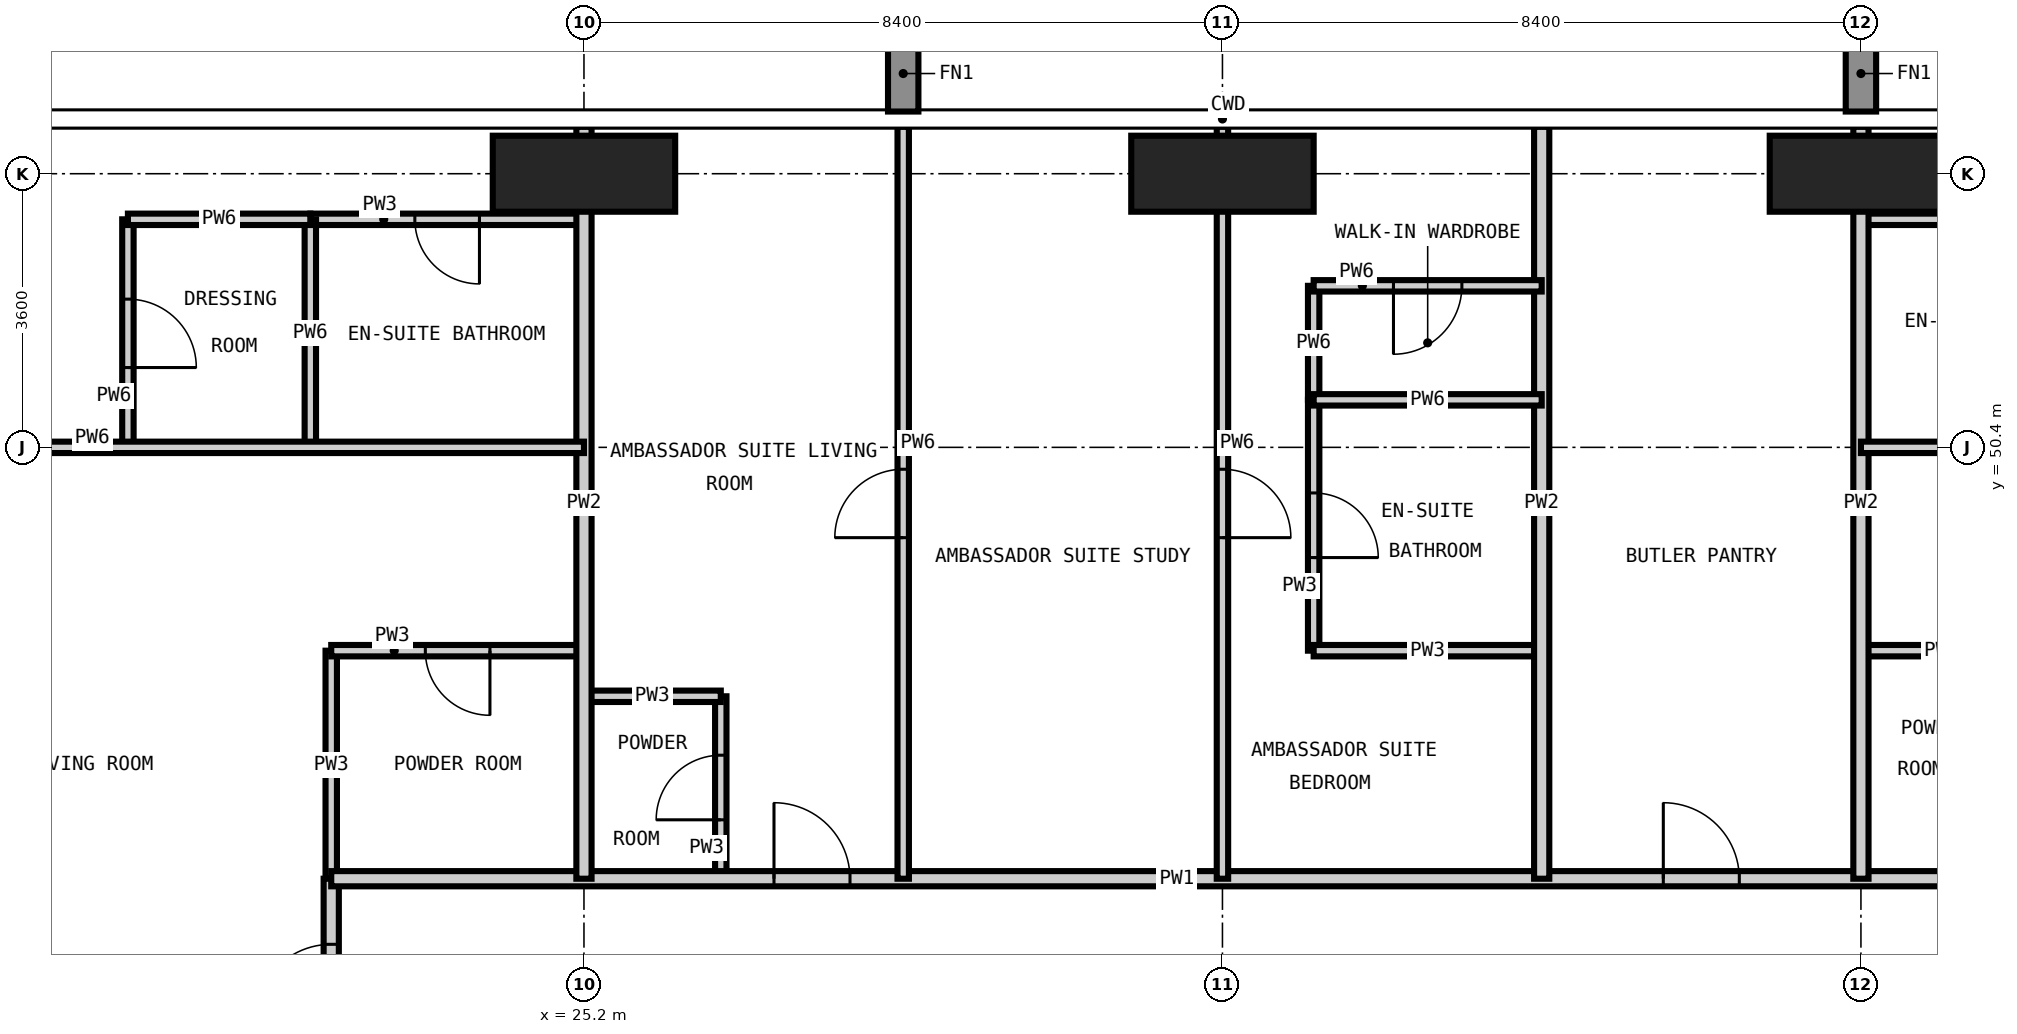
"""IFC4 building model, lengths in metres.
Left out: names, types, materials, properties, quantities, classifications, styles, units other than length and angle.
Written with IfcOpenShell. Run it as: python <this file> out.ifc"""

import sys

from ifc_helpers import new_model, si_unit, direction, frame, frame_2d, origin, origin_2d, place, context, subcontext, project, spatial, rectangle, extrude, element, fill, save


model = new_model("IFC4")
c1 = context("Model", 3, precision=1e-05, world=origin(), true_north=direction((0.0, 1.0)))
c2 = subcontext(c1, "Body", "Model", "MODEL_VIEW")
j1 = project(units=[si_unit("LENGTHUNIT", "METRE"), si_unit("PLANEANGLEUNIT", "RADIAN")], contexts=[c1])
p1 = place(None, origin())
s1 = spatial("IfcSite", under=j1, at=p1, CompositionType="ELEMENT")
p2 = place(p1, origin())
s2 = spatial("IfcBuilding", under=s1, at=p2, CompositionType="ELEMENT")
p3 = place(p2, frame((0.0, 0.0, 241.2)))
s3 = spatial("IfcBuildingStorey", under=s2, at=p3, CompositionType="ELEMENT", Elevation=241.2)
for number, where, z_axis, x_axis in (
    (1, (25.2, 54.0, -0.35), (0.0, 0.0, 1.0), (1.0, 0.0, 0.0)),
    (2, (33.6, 54.0, -0.35), (0.0, 0.0, 1.0), (1.0, 0.0, 0.0)),
    (3, (42.0, 54.0, -0.35), (0.0, 0.0, 1.0), (1.0, 0.0, 0.0)),
):
    element("IfcColumn", number, at=place(p3, frame(where, z_axis=z_axis, x_axis=x_axis)), inside=s3, PredefinedType="COLUMN", context=c2, shape_type="SweptSolid", body=[
        extrude(rectangle(XDim=2.4, YDim=1.0, at=origin_2d()), origin(), (0.0, 0.0, 1.0), 3.9),
    ])
p4 = place(p3, frame((21.875, 44.725, 0.0), z_axis=(0.0, 0.0, 1.0), x_axis=(0.0, 1.0, 0.0)))
e4 = element("IfcWall", 4, at=p4, inside=s3, PredefinedType="PARTITIONING", context=c2, shape_type="SweptSolid", body=[
    extrude(rectangle(XDim=3.0, YDim=0.15, at=frame_2d((1.5, 0.0))), origin(), (0.0, 0.0, 1.0), 3.55),
])
p5 = place(p3, frame((27.0, 44.725, 0.0), z_axis=(0.0, 0.0, 1.0), x_axis=(0.0, 1.0, 0.0)))
e5 = element("IfcWall", 5, at=p5, inside=s3, PredefinedType="PARTITIONING", context=c2, shape_type="SweptSolid", body=[
    extrude(rectangle(XDim=2.4, YDim=0.15, at=frame_2d((1.2, 0.0))), origin(), (0.0, 0.0, 1.0), 3.55),
])
p6 = place(p5, frame((0.775, 0.0, 0.0)))
e6 = element("IfcOpeningElement", 6, at=p6, cuts=e5, PredefinedType="OPENING", context=c2, shape_type="SweptSolid", body=[
    extrude(rectangle(XDim=0.85, YDim=2.1, at=frame_2d((0.425, 1.05))), frame((0.0, 0.085, 0.0), z_axis=(0.0, -1.0, 0.0), x_axis=(1.0, 0.0, 0.0)), (0.0, 0.0, 1.0), 0.17),
])
p7 = place(p3, frame((34.8, 47.725, 0.0), z_axis=(0.0, 0.0, 1.0), x_axis=(0.0, 1.0, 0.0)))
e7 = element("IfcWall", 7, at=p7, inside=s3, PredefinedType="PARTITIONING", context=c2, shape_type="SweptSolid", body=[
    extrude(rectangle(XDim=3.3, YDim=0.15, at=frame_2d((1.65, 0.0))), origin(), (0.0, 0.0, 1.0), 3.55),
])
p8 = place(p7, frame((1.225, 0.0, 0.0)))
e8 = element("IfcOpeningElement", 8, at=p8, cuts=e7, PredefinedType="OPENING", context=c2, shape_type="SweptSolid", body=[
    extrude(rectangle(XDim=0.85, YDim=2.1, at=frame_2d((0.425, 1.05))), frame((0.0, 0.085, 0.0), z_axis=(0.0, -1.0, 0.0), x_axis=(1.0, 0.0, 0.0)), (0.0, 0.0, 1.0), 0.17),
])
p9 = place(p3, frame((25.2, 47.125, 0.0), z_axis=(0.0, 0.0, 1.0), x_axis=(1.0, 0.0, 0.0)))
e9 = element("IfcWall", 9, at=p9, inside=s3, PredefinedType="PARTITIONING", context=c2, shape_type="SweptSolid", body=[
    extrude(rectangle(XDim=1.8, YDim=0.15, at=frame_2d((0.9, 0.0))), origin(), (0.0, 0.0, 1.0), 3.55),
])
p10 = place(p3, frame((21.875, 47.725, 0.0), z_axis=(0.0, 0.0, 1.0), x_axis=(1.0, 0.0, 0.0)))
e10 = element("IfcWall", 10, at=p10, inside=s3, PredefinedType="PARTITIONING", context=c2, shape_type="SweptSolid", body=[
    extrude(rectangle(XDim=3.325, YDim=0.15, at=frame_2d((1.663, 0.0))), origin(), (0.0, 0.0, 1.0), 3.55),
])
p11 = place(p10, frame((1.238, 0.0, 0.0)))
e11 = element("IfcOpeningElement", 11, at=p11, cuts=e10, PredefinedType="OPENING", context=c2, shape_type="SweptSolid", body=[
    extrude(rectangle(XDim=0.85, YDim=2.1, at=frame_2d((0.425, 1.05))), frame((0.0, 0.085, 0.0), z_axis=(0.0, -1.0, 0.0), x_axis=(1.0, 0.0, 0.0)), (0.0, 0.0, 1.0), 0.17),
])
p12 = place(p3, frame((34.8, 47.725, 0.0), z_axis=(0.0, 0.0, 1.0), x_axis=(1.0, 0.0, 0.0)))
e12 = element("IfcWall", 12, at=p12, inside=s3, PredefinedType="PARTITIONING", context=c2, shape_type="SweptSolid", body=[
    extrude(rectangle(XDim=3.0, YDim=0.15, at=frame_2d((1.5, 0.0))), origin(), (0.0, 0.0, 1.0), 3.55),
])
p13 = place(p3, frame((42.0, 47.725, 0.0), z_axis=(0.0, 0.0, 1.0), x_axis=(1.0, 0.0, 0.0)))
e13 = element("IfcWall", 13, at=p13, inside=s3, PredefinedType="PARTITIONING", context=c2, shape_type="SweptSolid", body=[
    extrude(rectangle(XDim=2.125, YDim=0.15, at=frame_2d((1.062, 0.0))), origin(), (0.0, 0.0, 1.0), 3.55),
])
p14 = place(p3, frame((21.6, 53.4, 0.0), z_axis=(0.0, 0.0, 1.0), x_axis=(1.0, 0.0, 0.0)))
e14 = element("IfcWall", 14, at=p14, inside=s3, PredefinedType="PARTITIONING", context=c2, shape_type="SweptSolid", body=[
    extrude(rectangle(XDim=3.6, YDim=0.15, at=frame_2d((1.8, 0.0))), origin(), (0.0, 0.0, 1.0), 3.55),
])
p15 = place(p14, frame((1.375, 0.0, 0.0)))
e15 = element("IfcOpeningElement", 15, at=p15, cuts=e14, PredefinedType="OPENING", context=c2, shape_type="SweptSolid", body=[
    extrude(rectangle(XDim=0.85, YDim=2.1, at=frame_2d((0.425, 1.05))), frame((0.0, 0.085, 0.0), z_axis=(0.0, -1.0, 0.0), x_axis=(1.0, 0.0, 0.0)), (0.0, 0.0, 1.0), 0.17),
])
p16 = place(p3, frame((42.0, 53.4, 0.0), z_axis=(0.0, 0.0, 1.0), x_axis=(1.0, 0.0, 0.0)))
e16 = element("IfcWall", 16, at=p16, inside=s3, PredefinedType="PARTITIONING", context=c2, shape_type="SweptSolid", body=[
    extrude(rectangle(XDim=3.6, YDim=0.15, at=frame_2d((1.8, 0.0))), origin(), (0.0, 0.0, 1.0), 3.55),
])
p17 = place(p16, frame((1.375, 0.0, 0.0)))
e17 = element("IfcOpeningElement", 17, at=p17, cuts=e16, PredefinedType="OPENING", context=c2, shape_type="SweptSolid", body=[
    extrude(rectangle(XDim=0.85, YDim=2.1, at=frame_2d((0.425, 1.05))), frame((0.0, 0.085, 0.0), z_axis=(0.0, -1.0, 0.0), x_axis=(1.0, 0.0, 0.0)), (0.0, 0.0, 1.0), 0.17),
])
p18 = place(p3, frame((21.875, 13.475, 0.0), z_axis=(0.0, 0.0, 1.0), x_axis=(0.0, 1.0, 0.0)))
e18 = element("IfcWall", 18, at=p18, inside=s3, PredefinedType="PARTITIONING", context=c2, shape_type="SweptSolid", body=[
    extrude(rectangle(XDim=31.25, YDim=0.2, at=frame_2d((15.625, 0.0))), origin(), (0.0, 0.0, 1.0), 3.55),
])
p19 = place(p18, frame((7.025, 0.0, 0.0)))
e19 = element("IfcOpeningElement", 19, at=p19, cuts=e18, PredefinedType="OPENING", context=c2, shape_type="SweptSolid", body=[
    extrude(rectangle(XDim=1.0, YDim=2.2, at=frame_2d((0.5, 1.1))), frame((0.0, 0.11, 0.0), z_axis=(0.0, -1.0, 0.0), x_axis=(1.0, 0.0, 0.0)), (0.0, 0.0, 1.0), 0.22),
])
p20 = place(p18, frame((15.425, 0.0, 0.0)))
e20 = element("IfcOpeningElement", 20, at=p20, cuts=e18, PredefinedType="OPENING", context=c2, shape_type="SweptSolid", body=[
    extrude(rectangle(XDim=1.0, YDim=2.2, at=frame_2d((0.5, 1.1))), frame((0.0, 0.11, 0.0), z_axis=(0.0, -1.0, 0.0), x_axis=(1.0, 0.0, 0.0)), (0.0, 0.0, 1.0), 0.22),
])
p21 = place(p18, frame((23.825, 0.0, 0.0)))
e21 = element("IfcOpeningElement", 21, at=p21, cuts=e18, PredefinedType="OPENING", context=c2, shape_type="SweptSolid", body=[
    extrude(rectangle(XDim=1.0, YDim=2.2, at=frame_2d((0.5, 1.1))), frame((0.0, 0.11, 0.0), z_axis=(0.0, -1.0, 0.0), x_axis=(1.0, 0.0, 0.0)), (0.0, 0.0, 1.0), 0.22),
])
p22 = place(p18, frame((1.162, 0.0, 0.0)))
e22 = element("IfcOpeningElement", 22, at=p22, cuts=e18, PredefinedType="OPENING", context=c2, shape_type="SweptSolid", body=[
    extrude(rectangle(XDim=1.0, YDim=2.2, at=frame_2d((0.5, 1.1))), frame((0.0, 0.11, 0.0), z_axis=(0.0, -1.0, 0.0), x_axis=(1.0, 0.0, 0.0)), (0.0, 0.0, 1.0), 0.22),
])
p23 = place(p18, frame((29.387, 0.0, 0.0)))
e23 = element("IfcOpeningElement", 23, at=p23, cuts=e18, PredefinedType="OPENING", context=c2, shape_type="SweptSolid", body=[
    extrude(rectangle(XDim=1.0, YDim=2.2, at=frame_2d((0.5, 1.1))), frame((0.0, 0.11, 0.0), z_axis=(0.0, -1.0, 0.0), x_axis=(1.0, 0.0, 0.0)), (0.0, 0.0, 1.0), 0.22),
])
p24 = place(p3, frame((21.875, 44.725, 0.0), z_axis=(0.0, 0.0, 1.0), x_axis=(1.0, 0.0, 0.0)))
e24 = element("IfcWall", 24, at=p24, inside=s3, PredefinedType="PARTITIONING", context=c2, shape_type="SweptSolid", body=[
    extrude(rectangle(XDim=22.25, YDim=0.2, at=frame_2d((11.125, 0.0))), origin(), (0.0, 0.0, 1.0), 3.55),
])
p25 = place(p24, frame((5.825, 0.0, 0.0)))
e25 = element("IfcOpeningElement", 25, at=p25, cuts=e24, PredefinedType="OPENING", context=c2, shape_type="SweptSolid", body=[
    extrude(rectangle(XDim=1.0, YDim=2.2, at=frame_2d((0.5, 1.1))), frame((0.0, 0.11, 0.0), z_axis=(0.0, -1.0, 0.0), x_axis=(1.0, 0.0, 0.0)), (0.0, 0.0, 1.0), 0.22),
])
p26 = place(p24, frame((17.525, 0.0, 0.0)))
e26 = element("IfcOpeningElement", 26, at=p26, cuts=e24, PredefinedType="OPENING", context=c2, shape_type="SweptSolid", body=[
    extrude(rectangle(XDim=1.0, YDim=2.1, at=frame_2d((0.5, 1.05))), frame((0.0, 0.11, 0.0), z_axis=(0.0, -1.0, 0.0), x_axis=(1.0, 0.0, 0.0)), (0.0, 0.0, 1.0), 0.22),
])
for number, where, z_axis, x_axis in (
    (27, (25.2, 44.725, 0.0), (0.0, 0.0, 1.0), (0.0, 1.0, 0.0)),
    (28, (37.8, 44.725, 0.0), (0.0, 0.0, 1.0), (0.0, 1.0, 0.0)),
    (29, (42.0, 44.725, 0.0), (0.0, 0.0, 1.0), (0.0, 1.0, 0.0)),
):
    element("IfcWall", number, at=place(p3, frame(where, z_axis=z_axis, x_axis=x_axis)), inside=s3, PredefinedType="PARTITIONING", context=c2, shape_type="SweptSolid", body=[
        extrude(rectangle(XDim=9.893, YDim=0.2, at=frame_2d((4.946, 0.0))), origin(), (0.0, 0.0, 1.0), 3.55),
    ])
p27 = place(p3, frame((19.2, 50.4, 0.0), z_axis=(0.0, 0.0, 1.0), x_axis=(0.0, 1.0, 0.0)))
e30 = element("IfcWall", 30, at=p27, inside=s3, PredefinedType="PARTITIONING", context=c2, shape_type="SweptSolid", body=[
    extrude(rectangle(XDim=3.0, YDim=0.15, at=frame_2d((1.5, 0.0))), origin(), (0.0, 0.0, 1.0), 3.55),
])
p28 = place(p27, frame((1.05, 0.0, 0.0)))
e31 = element("IfcOpeningElement", 31, at=p28, cuts=e30, PredefinedType="OPENING", context=c2, shape_type="SweptSolid", body=[
    extrude(rectangle(XDim=0.9, YDim=2.1, at=frame_2d((0.45, 1.05))), frame((0.0, 0.085, 0.0), z_axis=(0.0, -1.0, 0.0), x_axis=(1.0, 0.0, 0.0)), (0.0, 0.0, 1.0), 0.17),
])
p29 = place(p3, frame((21.6, 50.4, 0.0), z_axis=(0.0, 0.0, 1.0), x_axis=(0.0, 1.0, 0.0)))
e32 = element("IfcWall", 32, at=p29, inside=s3, PredefinedType="PARTITIONING", context=c2, shape_type="SweptSolid", body=[
    extrude(rectangle(XDim=3.0, YDim=0.15, at=frame_2d((1.5, 0.0))), origin(), (0.0, 0.0, 1.0), 3.55),
])
p30 = place(p3, frame((29.4, 44.725, 0.0), z_axis=(0.0, 0.0, 1.0), x_axis=(0.0, 1.0, 0.0)))
e33 = element("IfcWall", 33, at=p30, inside=s3, PredefinedType="PARTITIONING", context=c2, shape_type="SweptSolid", body=[
    extrude(rectangle(XDim=9.893, YDim=0.15, at=frame_2d((4.946, 0.0))), origin(), (0.0, 0.0, 1.0), 3.55),
])
p31 = place(p30, frame((4.487, 0.0, 0.0)))
e34 = element("IfcOpeningElement", 34, at=p31, cuts=e33, PredefinedType="OPENING", context=c2, shape_type="SweptSolid", body=[
    extrude(rectangle(XDim=0.9, YDim=2.1, at=frame_2d((0.45, 1.05))), frame((0.0, 0.085, 0.0), z_axis=(0.0, -1.0, 0.0), x_axis=(1.0, 0.0, 0.0)), (0.0, 0.0, 1.0), 0.17),
])
p32 = place(p3, frame((33.6, 44.725, 0.0), z_axis=(0.0, 0.0, 1.0), x_axis=(0.0, 1.0, 0.0)))
e35 = element("IfcWall", 35, at=p32, inside=s3, PredefinedType="PARTITIONING", context=c2, shape_type="SweptSolid", body=[
    extrude(rectangle(XDim=9.893, YDim=0.15, at=frame_2d((4.946, 0.0))), origin(), (0.0, 0.0, 1.0), 3.55),
])
p33 = place(p32, frame((4.487, 0.0, 0.0)))
e36 = element("IfcOpeningElement", 36, at=p33, cuts=e35, PredefinedType="OPENING", context=c2, shape_type="SweptSolid", body=[
    extrude(rectangle(XDim=0.9, YDim=2.1, at=frame_2d((0.45, 1.05))), frame((0.0, 0.085, 0.0), z_axis=(0.0, -1.0, 0.0), x_axis=(1.0, 0.0, 0.0)), (0.0, 0.0, 1.0), 0.17),
])
p34 = place(p3, frame((34.8, 51.025, 0.0), z_axis=(0.0, 0.0, 1.0), x_axis=(0.0, 1.0, 0.0)))
e37 = element("IfcWall", 37, at=p34, inside=s3, PredefinedType="PARTITIONING", context=c2, shape_type="SweptSolid", body=[
    extrude(rectangle(XDim=1.5, YDim=0.15, at=frame_2d((0.75, 0.0))), origin(), (0.0, 0.0, 1.0), 3.55),
])
p35 = place(p3, frame((12.582, 50.4, 0.0), z_axis=(0.0, 0.0, 1.0), x_axis=(1.0, 0.0, 0.0)))
e38 = element("IfcWall", 38, at=p35, inside=s3, PredefinedType="PARTITIONING", context=c2, shape_type="SweptSolid", body=[
    extrude(rectangle(XDim=12.618, YDim=0.15, at=frame_2d((6.309, 0.0))), origin(), (0.0, 0.0, 1.0), 3.55),
])
p36 = place(p35, frame((2.868, 0.0, 0.0)))
e39 = element("IfcOpeningElement", 39, at=p36, cuts=e38, PredefinedType="OPENING", context=c2, shape_type="SweptSolid", body=[
    extrude(rectangle(XDim=0.9, YDim=2.1, at=frame_2d((0.45, 1.05))), frame((0.0, 0.085, 0.0), z_axis=(0.0, -1.0, 0.0), x_axis=(1.0, 0.0, 0.0)), (0.0, 0.0, 1.0), 0.17),
])
p37 = place(p3, frame((42.0, 50.4, 0.0), z_axis=(0.0, 0.0, 1.0), x_axis=(1.0, 0.0, 0.0)))
e40 = element("IfcWall", 40, at=p37, inside=s3, PredefinedType="PARTITIONING", context=c2, shape_type="SweptSolid", body=[
    extrude(rectangle(XDim=12.618, YDim=0.15, at=frame_2d((6.309, 0.0))), origin(), (0.0, 0.0, 1.0), 3.55),
])
p38 = place(p37, frame((8.85, 0.0, 0.0)))
e41 = element("IfcOpeningElement", 41, at=p38, cuts=e40, PredefinedType="OPENING", context=c2, shape_type="SweptSolid", body=[
    extrude(rectangle(XDim=0.9, YDim=2.1, at=frame_2d((0.45, 1.05))), frame((0.0, 0.085, 0.0), z_axis=(0.0, -1.0, 0.0), x_axis=(1.0, 0.0, 0.0)), (0.0, 0.0, 1.0), 0.17),
])
p39 = place(p3, frame((34.8, 51.025, 0.0), z_axis=(0.0, 0.0, 1.0), x_axis=(1.0, 0.0, 0.0)))
e42 = element("IfcWall", 42, at=p39, inside=s3, PredefinedType="PARTITIONING", context=c2, shape_type="SweptSolid", body=[
    extrude(rectangle(XDim=3.0, YDim=0.15, at=frame_2d((1.5, 0.0))), origin(), (0.0, 0.0, 1.0), 3.55),
])
p40 = place(p3, frame((34.8, 52.525, 0.0), z_axis=(0.0, 0.0, 1.0), x_axis=(1.0, 0.0, 0.0)))
e43 = element("IfcWall", 43, at=p40, inside=s3, PredefinedType="PARTITIONING", context=c2, shape_type="SweptSolid", body=[
    extrude(rectangle(XDim=3.0, YDim=0.15, at=frame_2d((1.5, 0.0))), origin(), (0.0, 0.0, 1.0), 3.55),
])
p41 = place(p40, frame((1.05, 0.0, 0.0)))
e44 = element("IfcOpeningElement", 44, at=p41, cuts=e43, PredefinedType="OPENING", context=c2, shape_type="SweptSolid", body=[
    extrude(rectangle(XDim=0.9, YDim=2.1, at=frame_2d((0.45, 1.05))), frame((0.0, 0.085, 0.0), z_axis=(0.0, -1.0, 0.0), x_axis=(1.0, 0.0, 0.0)), (0.0, 0.0, 1.0), 0.17),
])
p42 = place(p3, frame((19.2, 53.4, 0.0), z_axis=(0.0, 0.0, 1.0), x_axis=(1.0, 0.0, 0.0)))
e45 = element("IfcWall", 45, at=p42, inside=s3, PredefinedType="PARTITIONING", context=c2, shape_type="SweptSolid", body=[
    extrude(rectangle(XDim=2.4, YDim=0.15, at=frame_2d((1.2, 0.0))), origin(), (0.0, 0.0, 1.0), 3.55),
])
p43 = place(p25, origin())
e46 = element("IfcDoor", 46, at=p43, inside=s3, OperationType="SINGLE_SWING_LEFT", PredefinedType="DOOR", context=c2, shape_type="SweptSolid", body=[
    extrude(rectangle(XDim=1.0, YDim=2.2, at=frame_2d((0.5, 1.1))), frame((0.0, 0.025, 0.0), z_axis=(0.0, -1.0, 0.0), x_axis=(1.0, 0.0, 0.0)), (0.0, 0.0, 1.0), 0.05),
])
fill(e25, e46)
p44 = place(p6, origin())
e47 = element("IfcDoor", 47, at=p44, inside=s3, OperationType="SINGLE_SWING_LEFT", PredefinedType="DOOR", context=c2, shape_type="SweptSolid", body=[
    extrude(rectangle(XDim=0.85, YDim=2.1, at=frame_2d((0.425, 1.05))), frame((0.0, 0.025, 0.0), z_axis=(0.0, -1.0, 0.0), x_axis=(1.0, 0.0, 0.0)), (0.0, 0.0, 1.0), 0.05),
])
fill(e6, e47)
p45 = place(p31, origin())
e48 = element("IfcDoor", 48, at=p45, inside=s3, OperationType="SINGLE_SWING_LEFT", PredefinedType="DOOR", context=c2, shape_type="SweptSolid", body=[
    extrude(rectangle(XDim=0.9, YDim=2.1, at=frame_2d((0.45, 1.05))), frame((0.0, 0.025, 0.0), z_axis=(0.0, -1.0, 0.0), x_axis=(1.0, 0.0, 0.0)), (0.0, 0.0, 1.0), 0.05),
])
fill(e34, e48)
p46 = place(p33, frame((0.9, 0.0, 0.0), z_axis=(0.0, 0.0, 1.0), x_axis=(-1.0, 0.0, 0.0)))
e49 = element("IfcDoor", 49, at=p46, inside=s3, OperationType="SINGLE_SWING_RIGHT", PredefinedType="DOOR", context=c2, shape_type="SweptSolid", body=[
    extrude(rectangle(XDim=0.9, YDim=2.1, at=frame_2d((0.45, 1.05))), frame((0.0, 0.025, 0.0), z_axis=(0.0, -1.0, 0.0), x_axis=(1.0, 0.0, 0.0)), (0.0, 0.0, 1.0), 0.05),
])
fill(e36, e49)
p47 = place(p8, frame((0.85, 0.0, 0.0), z_axis=(0.0, 0.0, 1.0), x_axis=(-1.0, 0.0, 0.0)))
e50 = element("IfcDoor", 50, at=p47, inside=s3, OperationType="SINGLE_SWING_RIGHT", PredefinedType="DOOR", context=c2, shape_type="SweptSolid", body=[
    extrude(rectangle(XDim=0.85, YDim=2.1, at=frame_2d((0.425, 1.05))), frame((0.0, 0.025, 0.0), z_axis=(0.0, -1.0, 0.0), x_axis=(1.0, 0.0, 0.0)), (0.0, 0.0, 1.0), 0.05),
])
fill(e8, e50)
p48 = place(p41, frame((0.9, 0.0, 0.0), z_axis=(0.0, 0.0, 1.0), x_axis=(-1.0, 0.0, 0.0)))
e51 = element("IfcDoor", 51, at=p48, inside=s3, OperationType="SINGLE_SWING_RIGHT", PredefinedType="DOOR", context=c2, shape_type="SweptSolid", body=[
    extrude(rectangle(XDim=0.9, YDim=2.1, at=frame_2d((0.45, 1.05))), frame((0.0, 0.025, 0.0), z_axis=(0.0, -1.0, 0.0), x_axis=(1.0, 0.0, 0.0)), (0.0, 0.0, 1.0), 0.05),
])
fill(e44, e51)
p49 = place(p26, origin())
e52 = element("IfcDoor", 52, at=p49, inside=s3, OperationType="SINGLE_SWING_LEFT", PredefinedType="DOOR", context=c2, shape_type="SweptSolid", body=[
    extrude(rectangle(XDim=1.0, YDim=2.1, at=frame_2d((0.5, 1.05))), frame((0.0, 0.025, 0.0), z_axis=(0.0, -1.0, 0.0), x_axis=(1.0, 0.0, 0.0)), (0.0, 0.0, 1.0), 0.05),
])
fill(e26, e52)
p50 = place(p23, origin())
e53 = element("IfcDoor", 53, at=p50, inside=s3, OperationType="SINGLE_SWING_LEFT", PredefinedType="DOOR", context=c2, shape_type="SweptSolid", body=[
    extrude(rectangle(XDim=1.0, YDim=2.2, at=frame_2d((0.5, 1.1))), frame((0.0, 0.025, 0.0), z_axis=(0.0, -1.0, 0.0), x_axis=(1.0, 0.0, 0.0)), (0.0, 0.0, 1.0), 0.05),
])
fill(e23, e53)
p51 = place(p11, frame((0.85, 0.0, 0.0), z_axis=(0.0, 0.0, 1.0), x_axis=(-1.0, 0.0, 0.0)))
e54 = element("IfcDoor", 54, at=p51, inside=s3, OperationType="SINGLE_SWING_LEFT", PredefinedType="DOOR", context=c2, shape_type="SweptSolid", body=[
    extrude(rectangle(XDim=0.85, YDim=2.1, at=frame_2d((0.425, 1.05))), frame((0.0, 0.025, 0.0), z_axis=(0.0, -1.0, 0.0), x_axis=(1.0, 0.0, 0.0)), (0.0, 0.0, 1.0), 0.05),
])
fill(e11, e54)
p52 = place(p15, frame((0.85, 0.0, 0.0), z_axis=(0.0, 0.0, 1.0), x_axis=(-1.0, 0.0, 0.0)))
e55 = element("IfcDoor", 55, at=p52, inside=s3, OperationType="SINGLE_SWING_LEFT", PredefinedType="DOOR", context=c2, shape_type="SweptSolid", body=[
    extrude(rectangle(XDim=0.85, YDim=2.1, at=frame_2d((0.425, 1.05))), frame((0.0, 0.025, 0.0), z_axis=(0.0, -1.0, 0.0), x_axis=(1.0, 0.0, 0.0)), (0.0, 0.0, 1.0), 0.05),
])
fill(e15, e55)
p53 = place(p28, frame((0.9, 0.0, 0.0), z_axis=(0.0, 0.0, 1.0), x_axis=(-1.0, 0.0, 0.0)))
e56 = element("IfcDoor", 56, at=p53, inside=s3, OperationType="SINGLE_SWING_RIGHT", PredefinedType="DOOR", context=c2, shape_type="SweptSolid", body=[
    extrude(rectangle(XDim=0.9, YDim=2.1, at=frame_2d((0.45, 1.05))), frame((0.0, 0.025, 0.0), z_axis=(0.0, -1.0, 0.0), x_axis=(1.0, 0.0, 0.0)), (0.0, 0.0, 1.0), 0.05),
])
fill(e31, e56)
save(model, sys.argv[1])
